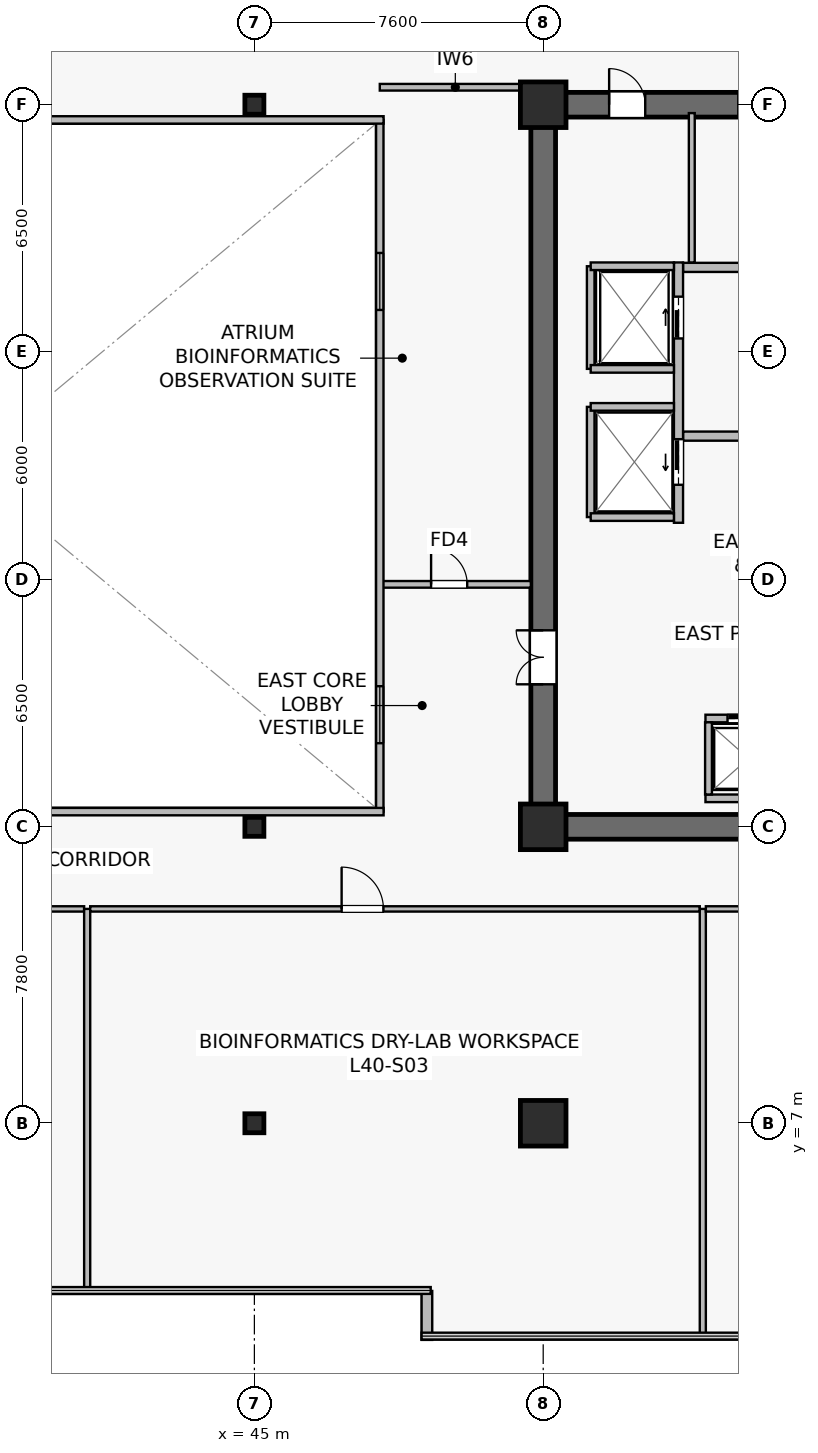
"""IFC4 building model, lengths in metres.
Left out: names, types, materials, properties, quantities, classifications, styles, units other than length and angle.
Written with IfcOpenShell. Run it as: python <this file> out.ifc"""

import sys

from ifc_helpers import new_model, si_unit, direction, frame, frame_2d, origin, origin_2d, place, context, subcontext, project, spatial, rectangle, hollow_rectangle, extrude, source, transform, mapped, element, fill, save


model = new_model("IFC4")
c1 = context("Model", 3, precision=1e-05, world=origin(), true_north=direction((0.0, 1.0)))
c2 = subcontext(c1, "Body", "Model", "MODEL_VIEW")
j1 = project(units=[si_unit("LENGTHUNIT", "METRE"), si_unit("PLANEANGLEUNIT", "RADIAN")], contexts=[c1])
p1 = place(None, origin())
s1 = spatial("IfcSite", under=j1, at=p1, CompositionType="ELEMENT")
p2 = place(p1, origin())
s2 = spatial("IfcBuilding", under=s1, at=p2, CompositionType="ELEMENT")
p3 = place(p2, frame((0.0, 0.0, 166.6)))
s3 = spatial("IfcBuildingStorey", under=s2, at=p3, CompositionType="ELEMENT", Elevation=166.6)
p4 = place(p3, frame((52.275, 14.8, 0.0), z_axis=(0.0, 0.0, 1.0), x_axis=(1.0, 0.0, 0.0)))
e1 = element("IfcWall", 1, at=p4, inside=s3, PredefinedType="SHEAR", context=c2, shape_type="SweptSolid", body=[
    extrude(rectangle(XDim=15.45, YDim=0.65, at=frame_2d((7.725, 0.0))), origin(), (0.0, 0.0, 1.0), 3.79),
])
p5 = place(p3, frame((52.275, 33.8, 0.0), z_axis=(0.0, 0.0, 1.0), x_axis=(1.0, 0.0, 0.0)))
e2 = element("IfcWall", 2, at=p5, inside=s3, PredefinedType="SHEAR", context=c2, shape_type="SweptSolid", body=[
    extrude(rectangle(XDim=15.45, YDim=0.65, at=frame_2d((7.725, 0.0))), origin(), (0.0, 0.0, 1.0), 3.79),
])
p6 = place(p5, frame((8.825, 0.0, 0.0)))
e3 = element("IfcOpeningElement", 3, at=p6, cuts=e2, PredefinedType="OPENING", context=c2, shape_type="SweptSolid", body=[
    extrude(rectangle(XDim=0.95, YDim=2.15, at=frame_2d((0.475, 1.075))), frame((0.0, 0.335, 0.0), z_axis=(0.0, -1.0, 0.0), x_axis=(1.0, 0.0, 0.0)), (0.0, 0.0, 1.0), 0.67),
])
p7 = place(p5, frame((5.46, 0.0, 0.0)))
e4 = element("IfcOpeningElement", 4, at=p7, cuts=e2, PredefinedType="OPENING", context=c2, shape_type="SweptSolid", body=[
    extrude(rectangle(XDim=0.95, YDim=2.15, at=frame_2d((0.475, 1.075))), frame((0.0, 0.335, 0.0), z_axis=(0.0, -1.0, 0.0), x_axis=(1.0, 0.0, 0.0)), (0.0, 0.0, 1.0), 0.67),
])
p8 = place(p5, frame((2.06, 0.0, 0.0)))
e5 = element("IfcOpeningElement", 5, at=p8, cuts=e2, PredefinedType="OPENING", context=c2, shape_type="SweptSolid", body=[
    extrude(rectangle(XDim=0.95, YDim=2.15, at=frame_2d((0.475, 1.075))), frame((0.0, 0.335, 0.0), z_axis=(0.0, -1.0, 0.0), x_axis=(1.0, 0.0, 0.0)), (0.0, 0.0, 1.0), 0.67),
])
p9 = place(p3, frame((52.6, 15.125, 0.0), z_axis=(0.0, 0.0, 1.0), x_axis=(0.0, 1.0, 0.0)))
e6 = element("IfcWall", 6, at=p9, inside=s3, PredefinedType="SHEAR", context=c2, shape_type="SweptSolid", body=[
    extrude(rectangle(XDim=18.35, YDim=0.65, at=frame_2d((9.175, 0.0))), origin(), (0.0, 0.0, 1.0), 3.79),
])
p10 = place(p9, frame((3.425, 0.0, 0.0)))
e7 = element("IfcOpeningElement", 7, at=p10, cuts=e6, PredefinedType="OPENING", context=c2, shape_type="SweptSolid", body=[
    extrude(rectangle(XDim=1.42, YDim=2.2, at=frame_2d((0.71, 1.1))), frame((0.0, 0.335, 0.0), z_axis=(0.0, -1.0, 0.0), x_axis=(1.0, 0.0, 0.0)), (0.0, 0.0, 1.0), 0.67),
])
m1 = source(origin(), c2, "Body", "SweptSolid", [
    extrude(rectangle(XDim=1.2, YDim=1.2, at=origin_2d()), origin(), (0.0, 0.0, 1.0), 4.1),
])
for number, where, z_axis, x_axis in (
    (8, (52.6, 7.0, 0.0), (0.0, 0.0, 1.0), (1.0, 0.0, 0.0)),
    (9, (52.6, 14.8, 0.0), (0.0, 0.0, 1.0), (1.0, 0.0, 0.0)),
    (10, (52.6, 33.8, 0.0), (0.0, 0.0, 1.0), (1.0, 0.0, 0.0)),
):
    element("IfcColumn", number, at=place(p3, frame(where, z_axis=z_axis, x_axis=x_axis)), inside=s3, PredefinedType="COLUMN", context=c2, shape_type="MappedRepresentation", body=[
        mapped(m1, transform((0.0, 0.0, 0.0), scale=1.0)),
    ])
m2 = source(origin(), c2, "Body", "SweptSolid", [
    extrude(hollow_rectangle(XDim=0.5, YDim=0.5, WallThickness=0.022, at=origin_2d()), origin(), (0.0, 0.0, 1.0), 4.1),
])
for number, where, z_axis, x_axis in (
    (11, (45.0, 7.0, 0.0), (0.0, 0.0, 1.0), (1.0, 0.0, 0.0)),
    (12, (45.0, 14.8, 0.0), (0.0, 0.0, 1.0), (1.0, 0.0, 0.0)),
    (13, (45.0, 33.8, 0.0), (0.0, 0.0, 1.0), (1.0, 0.0, 0.0)),
):
    element("IfcColumn", number, at=place(p3, frame(where, z_axis=z_axis, x_axis=x_axis)), inside=s3, PredefinedType="COLUMN", context=c2, shape_type="MappedRepresentation", body=[
        mapped(m2, transform((0.0, 0.0, 0.0), scale=1.0)),
    ])
p11 = place(p3, frame((49.54, 2.588, 0.0), z_axis=(0.0, 0.0, 1.0), x_axis=(0.0, -1.0, 0.0)))
e14 = element("IfcWall", 14, at=p11, inside=s3, PredefinedType="STANDARD", context=c2, shape_type="SweptSolid", body=[
    extrude(rectangle(XDim=1.288, YDim=0.28, at=frame_2d((0.644, 0.0))), origin(), (0.0, 0.0, 1.0), 3.79),
])
p12 = place(p3, frame((56.28, 25.08, 0.0), z_axis=(0.0, 0.0, 1.0), x_axis=(1.0, 0.0, 0.0)))
e15 = element("IfcWall", 15, at=p12, inside=s3, PredefinedType="SOLIDWALL", context=c2, shape_type="SweptSolid", body=[
    extrude(rectangle(XDim=6.92, YDim=0.24, at=frame_2d((3.46, 0.0))), origin(), (0.0, 0.0, 1.0), 3.187),
])
p13 = place(p12, frame((2.6, 0.0, 0.0)))
e16 = element("IfcOpeningElement", 16, at=p13, cuts=e15, PredefinedType="OPENING", context=c2, shape_type="SweptSolid", body=[
    extrude(rectangle(XDim=1.2, YDim=2.16, at=frame_2d((0.6, 1.08))), frame((0.0, 0.13, 0.0), z_axis=(0.0, -1.0, 0.0), x_axis=(1.0, 0.0, 0.0)), (0.0, 0.0, 1.0), 0.26),
])
p14 = place(p3, frame((56.28, 29.52, 0.0), z_axis=(0.0, 0.0, 1.0), x_axis=(1.0, 0.0, 0.0)))
e17 = element("IfcWall", 17, at=p14, inside=s3, PredefinedType="SOLIDWALL", context=c2, shape_type="SweptSolid", body=[
    extrude(rectangle(XDim=6.92, YDim=0.24, at=frame_2d((3.46, 0.0))), origin(), (0.0, 0.0, 1.0), 3.187),
])
p15 = place(p3, frame((56.16, 22.8, 0.0), z_axis=(0.0, 0.0, 1.0), x_axis=(0.0, 1.0, 0.0)))
e18 = element("IfcWall", 18, at=p15, inside=s3, PredefinedType="SOLIDWALL", context=c2, shape_type="SweptSolid", body=[
    extrude(rectangle(XDim=6.85, YDim=0.24, at=frame_2d((3.425, 0.0))), origin(), (0.0, 0.0, 1.0), 2.925),
])
p16 = place(p15, frame((4.85, 0.0, 0.0)))
e19 = element("IfcOpeningElement", 19, at=p16, cuts=e18, PredefinedType="OPENING", context=c2, shape_type="SweptSolid", body=[
    extrude(rectangle(XDim=1.1, YDim=2.22, at=frame_2d((0.55, 1.11))), frame((0.0, 0.13, 0.0), z_axis=(0.0, -1.0, 0.0), x_axis=(1.0, 0.0, 0.0)), (0.0, 0.0, 1.0), 0.26),
])
p17 = place(p15, frame((1.0, 0.0, 0.0)))
e20 = element("IfcOpeningElement", 20, at=p17, cuts=e18, PredefinedType="OPENING", context=c2, shape_type="SweptSolid", body=[
    extrude(rectangle(XDim=1.2, YDim=2.22, at=frame_2d((0.6, 1.11))), frame((0.0, 0.13, 0.0), z_axis=(0.0, -1.0, 0.0), x_axis=(1.0, 0.0, 0.0)), (0.0, 0.0, 1.0), 0.26),
])
p18 = place(p3, frame((56.87, 17.65, 0.0), z_axis=(0.0, 0.0, 1.0), x_axis=(1.0, 0.0, 0.0)))
e21 = element("IfcWall", 21, at=p18, inside=s3, PredefinedType="SOLIDWALL", context=c2, shape_type="SweptSolid", body=[
    extrude(rectangle(XDim=2.26, YDim=0.2, at=frame_2d((1.13, 0.0))), origin(), (0.0, 0.0, 1.0), 3.79),
])
p19 = place(p18, frame((0.58, 0.0, 0.0)))
e22 = element("IfcOpeningElement", 22, at=p19, cuts=e21, PredefinedType="OPENING", context=c2, shape_type="SweptSolid", body=[
    extrude(rectangle(XDim=1.1, YDim=2.22, at=frame_2d((0.55, 1.11))), frame((0.0, 0.11, 0.0), z_axis=(0.0, -1.0, 0.0), x_axis=(1.0, 0.0, 0.0)), (0.0, 0.0, 1.0), 0.22),
])
p20 = place(p3, frame((56.87, 15.55, 0.0), z_axis=(0.0, 0.0, 1.0), x_axis=(1.0, 0.0, 0.0)))
e23 = element("IfcWall", 23, at=p20, inside=s3, PredefinedType="SOLIDWALL", context=c2, shape_type="SweptSolid", body=[
    extrude(rectangle(XDim=2.26, YDim=0.2, at=frame_2d((1.13, 0.0))), origin(), (0.0, 0.0, 1.0), 3.79),
])
p21 = place(p3, frame((56.95, 15.65, 0.0), z_axis=(0.0, 0.0, 1.0), x_axis=(0.0, 1.0, 0.0)))
e24 = element("IfcWall", 24, at=p21, inside=s3, PredefinedType="SOLIDWALL", context=c2, shape_type="SweptSolid", body=[
    extrude(rectangle(XDim=1.9, YDim=0.18, at=frame_2d((0.95, 0.0))), origin(), (0.0, 0.0, 1.0), 3.79),
])
p22 = place(p3, frame((53.85, 26.85, 0.0), z_axis=(0.0, 0.0, 1.0), x_axis=(0.0, 1.0, 0.0)))
e25 = element("IfcWall", 25, at=p22, inside=s3, PredefinedType="SOLIDWALL", context=c2, shape_type="SweptSolid", body=[
    extrude(rectangle(XDim=2.7, YDim=0.2, at=frame_2d((1.35, 0.0))), origin(), (0.0, 0.0, 1.0), 3.79),
])
p23 = place(p3, frame((53.85, 29.55, 0.0), z_axis=(0.0, 0.0, 1.0), x_axis=(1.0, 0.0, 0.0)))
e26 = element("IfcWall", 26, at=p23, inside=s3, PredefinedType="SOLIDWALL", context=c2, shape_type="SweptSolid", body=[
    extrude(rectangle(XDim=2.19, YDim=0.2, at=frame_2d((1.095, 0.0))), origin(), (0.0, 0.0, 1.0), 3.79),
])
p24 = place(p3, frame((53.85, 26.85, 0.0), z_axis=(0.0, 0.0, 1.0), x_axis=(1.0, 0.0, 0.0)))
e27 = element("IfcWall", 27, at=p24, inside=s3, PredefinedType="SOLIDWALL", context=c2, shape_type="SweptSolid", body=[
    extrude(rectangle(XDim=2.19, YDim=0.2, at=frame_2d((1.095, 0.0))), origin(), (0.0, 0.0, 1.0), 3.187),
])
p25 = place(p3, frame((53.85, 22.95, 0.0), z_axis=(0.0, 0.0, 1.0), x_axis=(0.0, 1.0, 0.0)))
e28 = element("IfcWall", 28, at=p25, inside=s3, PredefinedType="SOLIDWALL", context=c2, shape_type="SweptSolid", body=[
    extrude(rectangle(XDim=2.9, YDim=0.2, at=frame_2d((1.45, 0.0))), origin(), (0.0, 0.0, 1.0), 2.925),
])
for number, where, z_axis, x_axis in (
    (29, (53.85, 25.85, 0.0), (0.0, 0.0, 1.0), (1.0, 0.0, 0.0)),
    (30, (53.85, 22.95, 0.0), (0.0, 0.0, 1.0), (1.0, 0.0, 0.0)),
):
    element("IfcWall", number, at=place(p3, frame(where, z_axis=z_axis, x_axis=x_axis)), inside=s3, PredefinedType="SOLIDWALL", context=c2, shape_type="SweptSolid", body=[
        extrude(rectangle(XDim=2.19, YDim=0.2, at=frame_2d((1.095, 0.0))), origin(), (0.0, 0.0, 1.0), 3.79),
    ])
p26 = place(p3, frame((56.51, 29.65, 0.0), z_axis=(0.0, 0.0, 1.0), x_axis=(0.0, 1.0, 0.0)))
e31 = element("IfcWall", 31, at=p26, inside=s3, PredefinedType="PLUMBINGWALL", context=c2, shape_type="SweptSolid", body=[
    extrude(rectangle(XDim=3.93, YDim=0.155, at=frame_2d((1.965, 0.0))), origin(), (0.0, 0.0, 1.0), 3.79),
])
p27 = place(p3, frame((48.3, 34.26, 0.0), z_axis=(0.0, 0.0, 1.0), x_axis=(1.0, 0.0, 0.0)))
e32 = element("IfcWall", 32, at=p27, inside=s3, PredefinedType="PARTITIONING", context=c2, shape_type="SweptSolid", body=[
    extrude(rectangle(XDim=3.975, YDim=0.175, at=frame_2d((1.987, 0.0))), origin(), (0.0, 0.0, 1.0), 3.475),
])
p28 = place(p3, frame((48.3, 21.18, 0.0), z_axis=(0.0, 0.0, 1.0), x_axis=(1.0, 0.0, 0.0)))
e33 = element("IfcWall", 33, at=p28, inside=s3, PredefinedType="PARTITIONING", context=c2, shape_type="SweptSolid", body=[
    extrude(rectangle(XDim=3.975, YDim=0.175, at=frame_2d((1.987, 0.0))), origin(), (0.0, 0.0, 1.0), 3.79),
])
p29 = place(p28, frame((1.35, 0.0, 0.0)))
e34 = element("IfcOpeningElement", 34, at=p29, cuts=e33, PredefinedType="OPENING", context=c2, shape_type="SweptSolid", body=[
    extrude(rectangle(XDim=0.95, YDim=2.15, at=frame_2d((0.475, 1.075))), frame((0.0, 0.098, 0.0), z_axis=(0.0, -1.0, 0.0), x_axis=(1.0, 0.0, 0.0)), (0.0, 0.0, 1.0), 0.195),
])
p30 = place(p3, frame((48.3, 15.2, 0.0), z_axis=(0.0, 0.0, 1.0), x_axis=(0.0, 1.0, 0.0)))
e35 = element("IfcWall", 35, at=p30, inside=s3, PredefinedType="SOLIDWALL", context=c2, shape_type="SweptSolid", body=[
    extrude(rectangle(XDim=18.2, YDim=0.195, at=frame_2d((9.1, 0.0))), origin(), (0.0, 0.0, 1.0), 3.79),
])
p31 = place(p30, frame((1.8, 0.0, 0.9)))
e36 = element("IfcOpeningElement", 36, at=p31, cuts=e35, PredefinedType="OPENING", context=c2, shape_type="SweptSolid", body=[
    extrude(rectangle(XDim=1.5, YDim=1.4, at=frame_2d((0.75, 0.7))), frame((0.0, 0.107, 0.0), z_axis=(0.0, -1.0, 0.0), x_axis=(1.0, 0.0, 0.0)), (0.0, 0.0, 1.0), 0.215),
])
p32 = place(p30, frame((13.2, 0.0, 0.9)))
e37 = element("IfcOpeningElement", 37, at=p32, cuts=e35, PredefinedType="OPENING", context=c2, shape_type="SweptSolid", body=[
    extrude(rectangle(XDim=1.5, YDim=1.4, at=frame_2d((0.75, 0.7))), frame((0.0, 0.107, 0.0), z_axis=(0.0, -1.0, 0.0), x_axis=(1.0, 0.0, 0.0)), (0.0, 0.0, 1.0), 0.215),
])
for number, where, z_axis, x_axis in (
    (38, (26.4, 15.2, 0.0), (0.0, 0.0, 1.0), (1.0, 0.0, 0.0)),
    (39, (26.4, 33.4, 0.0), (0.0, 0.0, 1.0), (1.0, 0.0, 0.0)),
):
    element("IfcWall", number, at=place(p3, frame(where, z_axis=z_axis, x_axis=x_axis)), inside=s3, PredefinedType="SOLIDWALL", context=c2, shape_type="SweptSolid", body=[
        extrude(rectangle(XDim=22.0, YDim=0.195, at=frame_2d((11.0, 0.0))), origin(), (0.0, 0.0, 1.0), 3.79),
    ])
p33 = place(p3, frame((18.08, 12.64, 0.0), z_axis=(0.0, 0.0, 1.0), x_axis=(1.0, 0.0, 0.0)))
e40 = element("IfcWall", 40, at=p33, inside=s3, PredefinedType="PARTITIONING", context=c2, shape_type="SweptSolid", body=[
    extrude(rectangle(XDim=22.44, YDim=0.14, at=frame_2d((11.22, 0.0))), origin(), (0.0, 0.0, 1.0), 3.187),
])
p34 = place(p33, frame((11.908, 0.0, 0.0)))
e41 = element("IfcOpeningElement", 41, at=p34, cuts=e40, PredefinedType="OPENING", context=c2, shape_type="SweptSolid", body=[
    extrude(rectangle(XDim=1.1, YDim=2.18, at=frame_2d((0.55, 1.09))), frame((0.0, 0.08, 0.0), z_axis=(0.0, -1.0, 0.0), x_axis=(1.0, 0.0, 0.0)), (0.0, 0.0, 1.0), 0.16),
])
p35 = place(p3, frame((40.6, 2.61, 0.0), z_axis=(0.0, 0.0, 1.0), x_axis=(0.0, 1.0, 0.0)))
e42 = element("IfcWall", 42, at=p35, inside=s3, PredefinedType="PARTITIONING", context=c2, shape_type="SweptSolid", body=[
    extrude(rectangle(XDim=10.03, YDim=0.16, at=frame_2d((5.015, 0.0))), origin(), (0.0, 0.0, 1.0), 3.075),
])
p36 = place(p3, frame((40.68, 12.64, 0.0), z_axis=(0.0, 0.0, 1.0), x_axis=(1.0, 0.0, 0.0)))
e43 = element("IfcWall", 43, at=p36, inside=s3, PredefinedType="PARTITIONING", context=c2, shape_type="SweptSolid", body=[
    extrude(rectangle(XDim=16.04, YDim=0.14, at=frame_2d((8.02, 0.0))), origin(), (0.0, 0.0, 1.0), 3.187),
])
p37 = place(p36, frame((6.615, 0.0, 0.0)))
e44 = element("IfcOpeningElement", 44, at=p37, cuts=e43, PredefinedType="OPENING", context=c2, shape_type="SweptSolid", body=[
    extrude(rectangle(XDim=1.1, YDim=2.18, at=frame_2d((0.55, 1.09))), frame((0.0, 0.08, 0.0), z_axis=(0.0, -1.0, 0.0), x_axis=(1.0, 0.0, 0.0)), (0.0, 0.0, 1.0), 0.16),
])
p38 = place(p3, frame((56.8, 1.41, 0.0), z_axis=(0.0, 0.0, 1.0), x_axis=(0.0, 1.0, 0.0)))
e45 = element("IfcWall", 45, at=p38, inside=s3, PredefinedType="PARTITIONING", context=c2, shape_type="SweptSolid", body=[
    extrude(rectangle(XDim=11.23, YDim=0.16, at=frame_2d((5.615, 0.0))), origin(), (0.0, 0.0, 1.0), 3.075),
])
p39 = place(p3, frame((56.88, 12.64, 0.0), z_axis=(0.0, 0.0, 1.0), x_axis=(1.0, 0.0, 0.0)))
e46 = element("IfcWall", 46, at=p39, inside=s3, PredefinedType="PARTITIONING", context=c2, shape_type="SweptSolid", body=[
    extrude(rectangle(XDim=10.94, YDim=0.14, at=frame_2d((5.47, 0.0))), origin(), (0.0, 0.0, 1.0), 3.187),
])
p40 = place(p39, frame((5.469, 0.0, 0.0)))
e47 = element("IfcOpeningElement", 47, at=p40, cuts=e46, PredefinedType="OPENING", context=c2, shape_type="SweptSolid", body=[
    extrude(rectangle(XDim=1.1, YDim=2.18, at=frame_2d((0.55, 1.09))), frame((0.0, 0.08, 0.0), z_axis=(0.0, -1.0, 0.0), x_axis=(1.0, 0.0, 0.0)), (0.0, 0.0, 1.0), 0.16),
])
m3 = source(origin(), c2, "Body", "SweptSolid", [
    extrude(rectangle(XDim=1.5, YDim=1.4, at=frame_2d((0.75, 0.7))), frame((0.0, 0.03, 0.0), z_axis=(0.0, -1.0, 0.0), x_axis=(1.0, 0.0, 0.0)), (0.0, 0.0, 1.0), 0.06),
])
p41 = place(p31, origin())
e48 = element("IfcWindow", 48, at=p41, inside=s3, PartitioningType="SINGLE_PANEL", PredefinedType="WINDOW", context=c2, shape_type="MappedRepresentation", body=[
    mapped(m3, transform((0.0, 0.0, 0.0), scale=1.0)),
])
fill(e36, e48)
p42 = place(p32, origin())
e49 = element("IfcWindow", 49, at=p42, inside=s3, PartitioningType="SINGLE_PANEL", PredefinedType="WINDOW", context=c2, shape_type="MappedRepresentation", body=[
    mapped(m3, transform((0.0, 0.0, 0.0), scale=1.0)),
])
fill(e37, e49)
m4 = source(origin(), c2, "Body", "SweptSolid", [
    extrude(rectangle(XDim=1.1, YDim=2.22, at=frame_2d((0.55, 1.11))), frame((0.0, 0.025, 0.0), z_axis=(0.0, -1.0, 0.0), x_axis=(1.0, 0.0, 0.0)), (0.0, 0.0, 1.0), 0.05),
])
p43 = place(p19, origin())
e50 = element("IfcDoor", 50, at=p43, inside=s3, OperationType="SLIDING_TO_RIGHT", PredefinedType="USERDEFINED", context=c2, shape_type="MappedRepresentation", body=[
    mapped(m4, transform((0.0, 0.0, 0.0), scale=1.0)),
])
fill(e22, e50)
p44 = place(p16, origin())
e51 = element("IfcDoor", 51, at=p44, inside=s3, OperationType="SLIDING_TO_RIGHT", PredefinedType="USERDEFINED", context=c2, shape_type="MappedRepresentation", body=[
    mapped(m4, transform((0.0, 0.0, 0.0), scale=1.0)),
])
fill(e19, e51)
m5 = source(origin(), c2, "Body", "SweptSolid", [
    extrude(rectangle(XDim=1.2, YDim=2.22, at=frame_2d((0.6, 1.11))), frame((0.0, 0.025, 0.0), z_axis=(0.0, -1.0, 0.0), x_axis=(1.0, 0.0, 0.0)), (0.0, 0.0, 1.0), 0.05),
])
p45 = place(p17, origin())
e52 = element("IfcDoor", 52, at=p45, inside=s3, OperationType="SLIDING_TO_LEFT", PredefinedType="USERDEFINED", context=c2, shape_type="MappedRepresentation", body=[
    mapped(m5, transform((0.0, 0.0, 0.0), scale=1.0)),
])
fill(e20, e52)
m6 = source(origin(), c2, "Body", "SweptSolid", [
    extrude(rectangle(XDim=1.42, YDim=2.2, at=frame_2d((0.71, 1.1))), frame((0.0, 0.025, 0.0), z_axis=(0.0, -1.0, 0.0), x_axis=(1.0, 0.0, 0.0)), (0.0, 0.0, 1.0), 0.05),
])
p46 = place(p10, origin())
e53 = element("IfcDoor", 53, at=p46, inside=s3, OperationType="DOUBLE_DOOR_SINGLE_SWING", PredefinedType="DOOR", context=c2, shape_type="MappedRepresentation", body=[
    mapped(m6, transform((0.0, 0.0, 0.0), scale=1.0)),
])
fill(e7, e53)
m7 = source(origin(), c2, "Body", "SweptSolid", [
    extrude(rectangle(XDim=0.95, YDim=2.15, at=frame_2d((0.475, 1.075))), frame((0.0, 0.025, 0.0), z_axis=(0.0, -1.0, 0.0), x_axis=(1.0, 0.0, 0.0)), (0.0, 0.0, 1.0), 0.05),
])
p47 = place(p8, origin())
e54 = element("IfcDoor", 54, at=p47, inside=s3, OperationType="SINGLE_SWING_LEFT", PredefinedType="DOOR", context=c2, shape_type="MappedRepresentation", body=[
    mapped(m7, transform((0.0, 0.0, 0.0), scale=1.0)),
])
fill(e5, e54)
p48 = place(p29, origin())
e55 = element("IfcDoor", 55, at=p48, inside=s3, OperationType="SINGLE_SWING_LEFT", PredefinedType="DOOR", context=c2, shape_type="MappedRepresentation", body=[
    mapped(m7, transform((0.0, 0.0, 0.0), scale=1.0)),
])
fill(e34, e55)
m8 = source(origin(), c2, "Body", "SweptSolid", [
    extrude(rectangle(XDim=1.1, YDim=2.18, at=frame_2d((0.55, 1.09))), frame((0.0, 0.025, 0.0), z_axis=(0.0, -1.0, 0.0), x_axis=(1.0, 0.0, 0.0)), (0.0, 0.0, 1.0), 0.05),
])
p49 = place(p37, origin())
e56 = element("IfcDoor", 56, at=p49, inside=s3, OperationType="SINGLE_SWING_LEFT", PredefinedType="DOOR", context=c2, shape_type="MappedRepresentation", body=[
    mapped(m8, transform((0.0, 0.0, 0.0), scale=1.0)),
])
fill(e44, e56)
save(model, sys.argv[1])
